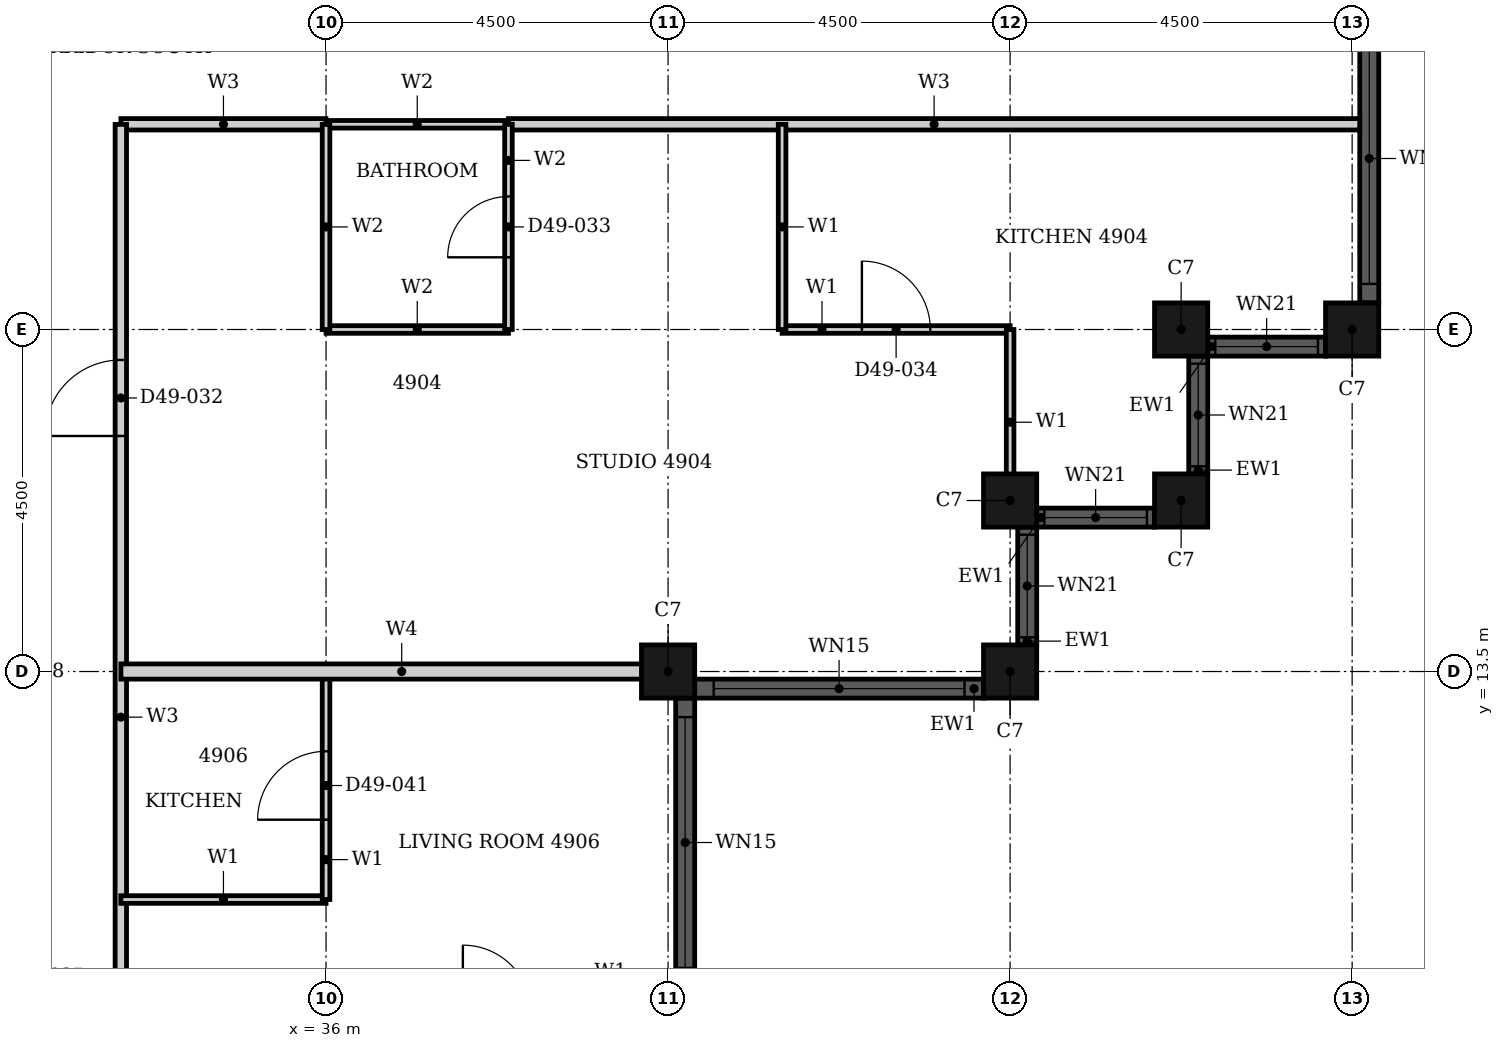
"""IFC4 building model, lengths in metres.
Left out: names, types, materials, properties, quantities, classifications, styles, units other than length and angle.
Written with IfcOpenShell. Run it as: python <this file> out.ifc"""

import sys

from ifc_helpers import new_model, si_unit, direction, frame, frame_2d, origin, origin_2d, place, context, subcontext, project, spatial, rectangle, hollow_rectangle, extrude, element, fill, save


model = new_model("IFC4")
c1 = context("Model", 3, precision=1e-05, world=origin(), true_north=direction((0.0, 1.0)))
c2 = subcontext(c1, "Body", "Model", "MODEL_VIEW")
j1 = project(units=[si_unit("LENGTHUNIT", "METRE"), si_unit("PLANEANGLEUNIT", "RADIAN")], contexts=[c1])
p1 = place(None, origin())
s1 = spatial("IfcSite", under=j1, at=p1, CompositionType="ELEMENT")
p2 = place(p1, origin())
s2 = spatial("IfcBuilding", under=s1, at=p2, CompositionType="ELEMENT")
p3 = place(p2, frame((0.0, 0.0, 196.1)))
s3 = spatial("IfcBuildingStorey", under=s2, at=p3, CompositionType="ELEMENT", Elevation=196.1)
for number, where, z_axis, x_axis in (
    (1, (40.5, 13.5, 0.0), (0.0, 0.0, 1.0), (1.0, 0.0, 0.0)),
    (2, (45.0, 13.5, 0.0), (0.0, 0.0, 1.0), (1.0, 0.0, 0.0)),
    (3, (45.0, 15.75, 0.0), (0.0, 0.0, 1.0), (1.0, 0.0, 0.0)),
    (4, (47.25, 15.75, 0.0), (0.0, 0.0, 1.0), (1.0, 0.0, 0.0)),
    (5, (47.25, 18.0, 0.0), (0.0, 0.0, 1.0), (1.0, 0.0, 0.0)),
    (6, (49.5, 18.0, 0.0), (0.0, 0.0, 1.0), (1.0, 0.0, 0.0)),
):
    element("IfcColumn", number, at=place(p3, frame(where, z_axis=z_axis, x_axis=x_axis)), inside=s3, PredefinedType="COLUMN", context=c2, shape_type="SweptSolid", body=[
        extrude(hollow_rectangle(XDim=0.7, YDim=0.7, WallThickness=0.022, at=origin_2d()), origin(), (0.0, 0.0, 1.0), 3.7),
    ])
p4 = place(p3, frame((40.85, 13.275, 0.0), z_axis=(0.0, 0.0, 1.0), x_axis=(1.0, 0.0, 0.0)))
e7 = element("IfcWall", 7, at=p4, inside=s3, PredefinedType="SOLIDWALL", context=c2, shape_type="SweptSolid", body=[
    extrude(rectangle(XDim=3.8, YDim=0.25, at=frame_2d((1.9, 0.0))), origin(), (0.0, 0.0, 1.0), 3.7),
])
p5 = place(p4, frame((0.25, 0.0, 0.45)))
e8 = element("IfcOpeningElement", 8, at=p5, cuts=e7, PredefinedType="OPENING", context=c2, shape_type="SweptSolid", body=[
    extrude(rectangle(XDim=3.3, YDim=2.3, at=frame_2d((1.65, 1.15))), frame((0.0, 0.135, 0.0), z_axis=(0.0, -1.0, 0.0), x_axis=(1.0, 0.0, 0.0)), (0.0, 0.0, 1.0), 0.27),
])
p6 = place(p3, frame((45.225, 13.85, 0.0), z_axis=(0.0, 0.0, 1.0), x_axis=(0.0, 1.0, 0.0)))
e9 = element("IfcWall", 9, at=p6, inside=s3, PredefinedType="SOLIDWALL", context=c2, shape_type="SweptSolid", body=[
    extrude(rectangle(XDim=1.55, YDim=0.25, at=frame_2d((0.775, 0.0))), origin(), (0.0, 0.0, 1.0), 3.7),
])
p7 = place(p6, frame((0.1, 0.0, 0.9)))
e10 = element("IfcOpeningElement", 10, at=p7, cuts=e9, PredefinedType="OPENING", context=c2, shape_type="SweptSolid", body=[
    extrude(rectangle(XDim=1.35, YDim=1.85, at=frame_2d((0.675, 0.925))), frame((0.0, 0.135, 0.0), z_axis=(0.0, -1.0, 0.0), x_axis=(1.0, 0.0, 0.0)), (0.0, 0.0, 1.0), 0.27),
])
p8 = place(p3, frame((45.35, 15.525, 0.0), z_axis=(0.0, 0.0, 1.0), x_axis=(1.0, 0.0, 0.0)))
e11 = element("IfcWall", 11, at=p8, inside=s3, PredefinedType="SOLIDWALL", context=c2, shape_type="SweptSolid", body=[
    extrude(rectangle(XDim=1.55, YDim=0.25, at=frame_2d((0.775, 0.0))), origin(), (0.0, 0.0, 1.0), 3.7),
])
p9 = place(p8, frame((0.1, 0.0, 0.9)))
e12 = element("IfcOpeningElement", 12, at=p9, cuts=e11, PredefinedType="OPENING", context=c2, shape_type="SweptSolid", body=[
    extrude(rectangle(XDim=1.35, YDim=1.85, at=frame_2d((0.675, 0.925))), frame((0.0, 0.135, 0.0), z_axis=(0.0, -1.0, 0.0), x_axis=(1.0, 0.0, 0.0)), (0.0, 0.0, 1.0), 0.27),
])
p10 = place(p3, frame((47.475, 16.1, 0.0), z_axis=(0.0, 0.0, 1.0), x_axis=(0.0, 1.0, 0.0)))
e13 = element("IfcWall", 13, at=p10, inside=s3, PredefinedType="SOLIDWALL", context=c2, shape_type="SweptSolid", body=[
    extrude(rectangle(XDim=1.55, YDim=0.25, at=frame_2d((0.775, 0.0))), origin(), (0.0, 0.0, 1.0), 3.7),
])
p11 = place(p10, frame((0.1, 0.0, 0.9)))
e14 = element("IfcOpeningElement", 14, at=p11, cuts=e13, PredefinedType="OPENING", context=c2, shape_type="SweptSolid", body=[
    extrude(rectangle(XDim=1.35, YDim=1.85, at=frame_2d((0.675, 0.925))), frame((0.0, 0.135, 0.0), z_axis=(0.0, -1.0, 0.0), x_axis=(1.0, 0.0, 0.0)), (0.0, 0.0, 1.0), 0.27),
])
p12 = place(p3, frame((47.6, 17.775, 0.0), z_axis=(0.0, 0.0, 1.0), x_axis=(1.0, 0.0, 0.0)))
e15 = element("IfcWall", 15, at=p12, inside=s3, PredefinedType="SOLIDWALL", context=c2, shape_type="SweptSolid", body=[
    extrude(rectangle(XDim=1.55, YDim=0.25, at=frame_2d((0.775, 0.0))), origin(), (0.0, 0.0, 1.0), 3.7),
])
p13 = place(p12, frame((0.1, 0.0, 0.9)))
e16 = element("IfcOpeningElement", 16, at=p13, cuts=e15, PredefinedType="OPENING", context=c2, shape_type="SweptSolid", body=[
    extrude(rectangle(XDim=1.35, YDim=1.85, at=frame_2d((0.675, 0.925))), frame((0.0, 0.135, 0.0), z_axis=(0.0, -1.0, 0.0), x_axis=(1.0, 0.0, 0.0)), (0.0, 0.0, 1.0), 0.27),
])
p14 = place(p3, frame((49.725, 18.35, 0.0), z_axis=(0.0, 0.0, 1.0), x_axis=(0.0, 1.0, 0.0)))
e17 = element("IfcWall", 17, at=p14, inside=s3, PredefinedType="SOLIDWALL", context=c2, shape_type="SweptSolid", body=[
    extrude(rectangle(XDim=8.3, YDim=0.25, at=frame_2d((4.15, 0.0))), origin(), (0.0, 0.0, 1.0), 3.7),
])
p15 = place(p14, frame((0.25, 0.0, 0.45)))
e18 = element("IfcOpeningElement", 18, at=p15, cuts=e17, PredefinedType="OPENING", context=c2, shape_type="SweptSolid", body=[
    extrude(rectangle(XDim=3.3, YDim=2.3, at=frame_2d((1.65, 1.15))), frame((0.0, 0.135, 0.0), z_axis=(0.0, -1.0, 0.0), x_axis=(1.0, 0.0, 0.0)), (0.0, 0.0, 1.0), 0.27),
])
p16 = place(p14, frame((4.75, 0.0, 0.45)))
e19 = element("IfcOpeningElement", 19, at=p16, cuts=e17, PredefinedType="OPENING", context=c2, shape_type="SweptSolid", body=[
    extrude(rectangle(XDim=3.3, YDim=2.3, at=frame_2d((1.65, 1.15))), frame((0.0, 0.135, 0.0), z_axis=(0.0, -1.0, 0.0), x_axis=(1.0, 0.0, 0.0)), (0.0, 0.0, 1.0), 0.27),
])
p17 = place(p3, frame((40.725, 4.85, 0.0), z_axis=(0.0, 0.0, 1.0), x_axis=(0.0, 1.0, 0.0)))
e20 = element("IfcWall", 20, at=p17, inside=s3, PredefinedType="SOLIDWALL", context=c2, shape_type="SweptSolid", body=[
    extrude(rectangle(XDim=8.3, YDim=0.25, at=frame_2d((4.15, 0.0))), origin(), (0.0, 0.0, 1.0), 3.7),
])
p18 = place(p17, frame((0.25, 0.0, 0.45)))
e21 = element("IfcOpeningElement", 21, at=p18, cuts=e20, PredefinedType="OPENING", context=c2, shape_type="SweptSolid", body=[
    extrude(rectangle(XDim=3.3, YDim=2.3, at=frame_2d((1.65, 1.15))), frame((0.0, 0.135, 0.0), z_axis=(0.0, -1.0, 0.0), x_axis=(1.0, 0.0, 0.0)), (0.0, 0.0, 1.0), 0.27),
])
p19 = place(p17, frame((4.75, 0.0, 0.45)))
e22 = element("IfcOpeningElement", 22, at=p19, cuts=e20, PredefinedType="OPENING", context=c2, shape_type="SweptSolid", body=[
    extrude(rectangle(XDim=3.3, YDim=2.3, at=frame_2d((1.65, 1.15))), frame((0.0, 0.135, 0.0), z_axis=(0.0, -1.0, 0.0), x_axis=(1.0, 0.0, 0.0)), (0.0, 0.0, 1.0), 0.27),
])
p20 = place(p3, frame((33.301, 20.7, 0.0), z_axis=(0.0, 0.0, 1.0), x_axis=(1.0, 0.0, 0.0)))
e23 = element("IfcWall", 23, at=p20, inside=s3, PredefinedType="PARTITIONING", context=c2, shape_type="SweptSolid", body=[
    extrude(rectangle(XDim=2.698, YDim=0.15, at=frame_2d((1.349, 0.0))), origin(), (0.0, 0.0, 1.0), 3.4),
])
p21 = place(p3, frame((38.4, 20.7, 0.0), z_axis=(0.0, 0.0, 1.0), x_axis=(1.0, 0.0, 0.0)))
e24 = element("IfcWall", 24, at=p21, inside=s3, PredefinedType="PARTITIONING", context=c2, shape_type="SweptSolid", body=[
    extrude(rectangle(XDim=11.2, YDim=0.15, at=frame_2d((5.6, 0.0))), origin(), (0.0, 0.0, 1.0), 3.4),
])
p22 = place(p3, frame((33.3, 6.9, 0.0), z_axis=(0.0, 0.0, 1.0), x_axis=(0.0, 1.0, 0.0)))
e25 = element("IfcWall", 25, at=p22, inside=s3, PredefinedType="PARTITIONING", context=c2, shape_type="SweptSolid", body=[
    extrude(rectangle(XDim=13.799, YDim=0.15, at=frame_2d((6.899, 0.0))), origin(), (0.0, 0.0, 1.0), 3.4),
])
p23 = place(p22, frame((9.699, 0.0, 0.0)))
e26 = element("IfcOpeningElement", 26, at=p23, cuts=e25, PredefinedType="OPENING", context=c2, shape_type="SweptSolid", body=[
    extrude(rectangle(XDim=1.0, YDim=2.2, at=frame_2d((0.5, 1.1))), frame((0.0, 0.085, 0.0), z_axis=(0.0, -1.0, 0.0), x_axis=(1.0, 0.0, 0.0)), (0.0, 0.0, 1.0), 0.17),
])
p24 = place(p22, frame((1.3, 0.0, 0.0)))
e27 = element("IfcOpeningElement", 27, at=p24, cuts=e25, PredefinedType="OPENING", context=c2, shape_type="SweptSolid", body=[
    extrude(rectangle(XDim=1.0, YDim=2.2, at=frame_2d((0.5, 1.1))), frame((0.0, 0.085, 0.0), z_axis=(0.0, -1.0, 0.0), x_axis=(1.0, 0.0, 0.0)), (0.0, 0.0, 1.0), 0.17),
])
p25 = place(p3, frame((33.3, 10.5, 0.0), z_axis=(0.0, 0.0, 1.0), x_axis=(1.0, 0.0, 0.0)))
e28 = element("IfcWall", 28, at=p25, inside=s3, PredefinedType="PARTITIONING", context=c2, shape_type="SweptSolid", body=[
    extrude(rectangle(XDim=2.7, YDim=0.1, at=frame_2d((1.35, 0.0))), origin(), (0.0, 0.0, 1.0), 3.4),
])
p26 = place(p3, frame((42.0, 18.0, 0.0), z_axis=(0.0, 0.0, 1.0), x_axis=(1.0, 0.0, 0.0)))
e29 = element("IfcWall", 29, at=p26, inside=s3, PredefinedType="PARTITIONING", context=c2, shape_type="SweptSolid", body=[
    extrude(rectangle(XDim=3.0, YDim=0.1, at=frame_2d((1.5, 0.0))), origin(), (0.0, 0.0, 1.0), 3.4),
])
p27 = place(p26, frame((1.05, 0.0, 0.0)))
e30 = element("IfcOpeningElement", 30, at=p27, cuts=e29, PredefinedType="OPENING", context=c2, shape_type="SweptSolid", body=[
    extrude(rectangle(XDim=0.9, YDim=2.1, at=frame_2d((0.45, 1.05))), frame((0.0, 0.06, 0.0), z_axis=(0.0, -1.0, 0.0), x_axis=(1.0, 0.0, 0.0)), (0.0, 0.0, 1.0), 0.12),
])
p28 = place(p3, frame((36.0, 10.5, 0.0), z_axis=(0.0, 0.0, 1.0), x_axis=(0.0, 1.0, 0.0)))
e31 = element("IfcWall", 31, at=p28, inside=s3, PredefinedType="PARTITIONING", context=c2, shape_type="SweptSolid", body=[
    extrude(rectangle(XDim=3.0, YDim=0.1, at=frame_2d((1.5, 0.0))), origin(), (0.0, 0.0, 1.0), 2.68),
])
p29 = place(p28, frame((1.05, 0.0, 0.0)))
e32 = element("IfcOpeningElement", 32, at=p29, cuts=e31, PredefinedType="OPENING", context=c2, shape_type="SweptSolid", body=[
    extrude(rectangle(XDim=0.9, YDim=2.1, at=frame_2d((0.45, 1.05))), frame((0.0, 0.06, 0.0), z_axis=(0.0, -1.0, 0.0), x_axis=(1.0, 0.0, 0.0)), (0.0, 0.0, 1.0), 0.12),
])
p30 = place(p3, frame((42.0, 18.0, 0.0), z_axis=(0.0, 0.0, 1.0), x_axis=(0.0, 1.0, 0.0)))
e33 = element("IfcWall", 33, at=p30, inside=s3, PredefinedType="PARTITIONING", context=c2, shape_type="SweptSolid", body=[
    extrude(rectangle(XDim=2.7, YDim=0.1, at=frame_2d((1.35, 0.0))), origin(), (0.0, 0.0, 1.0), 3.4),
])
p31 = place(p3, frame((45.0, 15.56, 0.0), z_axis=(0.0, 0.0, 1.0), x_axis=(0.0, 1.0, 0.0)))
e34 = element("IfcWall", 34, at=p31, inside=s3, PredefinedType="PARTITIONING", context=c2, shape_type="SweptSolid", body=[
    extrude(rectangle(XDim=2.44, YDim=0.1, at=frame_2d((1.22, 0.0))), origin(), (0.0, 0.0, 1.0), 3.4),
])
p32 = place(p3, frame((33.301, 13.5, 0.0), z_axis=(0.0, 0.0, 1.0), x_axis=(1.0, 0.0, 0.0)))
e35 = element("IfcWall", 35, at=p32, inside=s3, PredefinedType="PARTITIONING", context=c2, shape_type="SweptSolid", body=[
    extrude(rectangle(XDim=7.389, YDim=0.2, at=frame_2d((3.694, 0.0))), origin(), (0.0, 0.0, 1.0), 2.48),
])
for number, where, z_axis, x_axis in (
    (36, (36.0, 18.0, 0.0), (0.0, 0.0, 1.0), (1.0, 0.0, 0.0)),
    (37, (36.0, 20.7, 0.0), (0.0, 0.0, 1.0), (1.0, 0.0, 0.0)),
):
    element("IfcWall", number, at=place(p3, frame(where, z_axis=z_axis, x_axis=x_axis)), inside=s3, PredefinedType="PARTITIONING", context=c2, shape_type="SweptSolid", body=[
        extrude(rectangle(XDim=2.4, YDim=0.1, at=frame_2d((1.2, 0.0))), origin(), (0.0, 0.0, 1.0), 3.4),
    ])
p33 = place(p3, frame((36.0, 18.0, 0.0), z_axis=(0.0, 0.0, 1.0), x_axis=(0.0, 1.0, 0.0)))
e38 = element("IfcWall", 38, at=p33, inside=s3, PredefinedType="PARTITIONING", context=c2, shape_type="SweptSolid", body=[
    extrude(rectangle(XDim=2.699, YDim=0.1, at=frame_2d((1.35, 0.0))), origin(), (0.0, 0.0, 1.0), 3.4),
])
p34 = place(p3, frame((38.4, 18.0, 0.0), z_axis=(0.0, 0.0, 1.0), x_axis=(0.0, 1.0, 0.0)))
e39 = element("IfcWall", 39, at=p34, inside=s3, PredefinedType="PARTITIONING", context=c2, shape_type="SweptSolid", body=[
    extrude(rectangle(XDim=2.7, YDim=0.1, at=frame_2d((1.35, 0.0))), origin(), (0.0, 0.0, 1.0), 3.4),
])
p35 = place(p34, frame((0.95, 0.0, 0.0)))
e40 = element("IfcOpeningElement", 40, at=p35, cuts=e39, PredefinedType="OPENING", context=c2, shape_type="SweptSolid", body=[
    extrude(rectangle(XDim=0.8, YDim=2.1, at=frame_2d((0.4, 1.05))), frame((0.0, 0.06, 0.0), z_axis=(0.0, -1.0, 0.0), x_axis=(1.0, 0.0, 0.0)), (0.0, 0.0, 1.0), 0.12),
])
p36 = place(p5, origin())
e41 = element("IfcWindow", 41, at=p36, inside=s3, PartitioningType="SINGLE_PANEL", PredefinedType="WINDOW", context=c2, shape_type="SweptSolid", body=[
    extrude(rectangle(XDim=3.3, YDim=2.3, at=frame_2d((1.65, 1.15))), frame((0.0, 0.03, 0.0), z_axis=(0.0, -1.0, 0.0), x_axis=(1.0, 0.0, 0.0)), (0.0, 0.0, 1.0), 0.06),
])
fill(e8, e41)
p37 = place(p7, origin())
e42 = element("IfcWindow", 42, at=p37, inside=s3, PartitioningType="SINGLE_PANEL", PredefinedType="WINDOW", context=c2, shape_type="SweptSolid", body=[
    extrude(rectangle(XDim=1.35, YDim=1.85, at=frame_2d((0.675, 0.925))), frame((0.0, 0.03, 0.0), z_axis=(0.0, -1.0, 0.0), x_axis=(1.0, 0.0, 0.0)), (0.0, 0.0, 1.0), 0.06),
])
fill(e10, e42)
p38 = place(p9, origin())
e43 = element("IfcWindow", 43, at=p38, inside=s3, PartitioningType="SINGLE_PANEL", PredefinedType="WINDOW", context=c2, shape_type="SweptSolid", body=[
    extrude(rectangle(XDim=1.35, YDim=1.85, at=frame_2d((0.675, 0.925))), frame((0.0, 0.03, 0.0), z_axis=(0.0, -1.0, 0.0), x_axis=(1.0, 0.0, 0.0)), (0.0, 0.0, 1.0), 0.06),
])
fill(e12, e43)
p39 = place(p11, origin())
e44 = element("IfcWindow", 44, at=p39, inside=s3, PartitioningType="SINGLE_PANEL", PredefinedType="WINDOW", context=c2, shape_type="SweptSolid", body=[
    extrude(rectangle(XDim=1.35, YDim=1.85, at=frame_2d((0.675, 0.925))), frame((0.0, 0.03, 0.0), z_axis=(0.0, -1.0, 0.0), x_axis=(1.0, 0.0, 0.0)), (0.0, 0.0, 1.0), 0.06),
])
fill(e14, e44)
p40 = place(p13, origin())
e45 = element("IfcWindow", 45, at=p40, inside=s3, PartitioningType="SINGLE_PANEL", PredefinedType="WINDOW", context=c2, shape_type="SweptSolid", body=[
    extrude(rectangle(XDim=1.35, YDim=1.85, at=frame_2d((0.675, 0.925))), frame((0.0, 0.03, 0.0), z_axis=(0.0, -1.0, 0.0), x_axis=(1.0, 0.0, 0.0)), (0.0, 0.0, 1.0), 0.06),
])
fill(e16, e45)
p41 = place(p15, origin())
e46 = element("IfcWindow", 46, at=p41, inside=s3, PartitioningType="SINGLE_PANEL", PredefinedType="WINDOW", context=c2, shape_type="SweptSolid", body=[
    extrude(rectangle(XDim=3.3, YDim=2.3, at=frame_2d((1.65, 1.15))), frame((0.0, 0.03, 0.0), z_axis=(0.0, -1.0, 0.0), x_axis=(1.0, 0.0, 0.0)), (0.0, 0.0, 1.0), 0.06),
])
fill(e18, e46)
p42 = place(p19, origin())
e47 = element("IfcWindow", 47, at=p42, inside=s3, PartitioningType="SINGLE_PANEL", PredefinedType="WINDOW", context=c2, shape_type="SweptSolid", body=[
    extrude(rectangle(XDim=3.3, YDim=2.3, at=frame_2d((1.65, 1.15))), frame((0.0, 0.03, 0.0), z_axis=(0.0, -1.0, 0.0), x_axis=(1.0, 0.0, 0.0)), (0.0, 0.0, 1.0), 0.06),
])
fill(e22, e47)
p43 = place(p23, origin())
e48 = element("IfcDoor", 48, at=p43, inside=s3, OperationType="SINGLE_SWING_LEFT", PredefinedType="DOOR", context=c2, shape_type="SweptSolid", body=[
    extrude(rectangle(XDim=1.0, YDim=2.2, at=frame_2d((0.5, 1.1))), frame((0.0, 0.025, 0.0), z_axis=(0.0, -1.0, 0.0), x_axis=(1.0, 0.0, 0.0)), (0.0, 0.0, 1.0), 0.05),
])
fill(e26, e48)
p44 = place(p35, origin())
e49 = element("IfcDoor", 49, at=p44, inside=s3, OperationType="SINGLE_SWING_LEFT", PredefinedType="DOOR", context=c2, shape_type="SweptSolid", body=[
    extrude(rectangle(XDim=0.8, YDim=2.1, at=frame_2d((0.4, 1.05))), frame((0.0, 0.025, 0.0), z_axis=(0.0, -1.0, 0.0), x_axis=(1.0, 0.0, 0.0)), (0.0, 0.0, 1.0), 0.05),
])
fill(e40, e49)
p45 = place(p27, origin())
e50 = element("IfcDoor", 50, at=p45, inside=s3, OperationType="SINGLE_SWING_RIGHT", PredefinedType="DOOR", context=c2, shape_type="SweptSolid", body=[
    extrude(rectangle(XDim=0.9, YDim=2.1, at=frame_2d((0.45, 1.05))), frame((0.0, 0.025, 0.0), z_axis=(0.0, -1.0, 0.0), x_axis=(1.0, 0.0, 0.0)), (0.0, 0.0, 1.0), 0.05),
])
fill(e30, e50)
p46 = place(p29, origin())
e51 = element("IfcDoor", 51, at=p46, inside=s3, OperationType="SINGLE_SWING_RIGHT", PredefinedType="DOOR", context=c2, shape_type="SweptSolid", body=[
    extrude(rectangle(XDim=0.9, YDim=2.1, at=frame_2d((0.45, 1.05))), frame((0.0, 0.025, 0.0), z_axis=(0.0, -1.0, 0.0), x_axis=(1.0, 0.0, 0.0)), (0.0, 0.0, 1.0), 0.05),
])
fill(e32, e51)
save(model, sys.argv[1])
